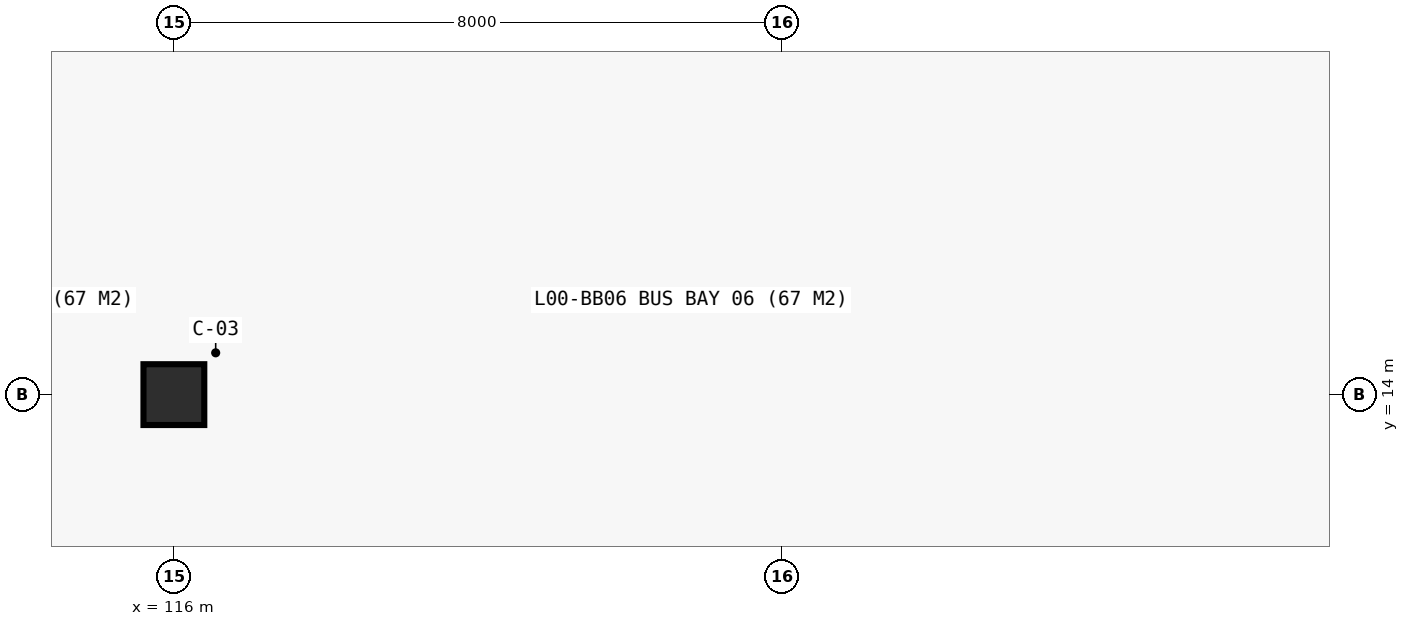
"""IFC4 building model, lengths in metres.
Left out: names, types, materials, properties, quantities, classifications, styles, units other than length and angle.
Written with IfcOpenShell. Run it as: python <this file> out.ifc"""

import sys

from ifc_helpers import new_model, si_unit, direction, frame, origin, origin_2d, place, context, subcontext, project, spatial, rectangle, extrude, element, save


model = new_model("IFC4")
c1 = context("Model", 3, precision=1e-05, world=origin(), true_north=direction((0.0, 1.0)))
c2 = subcontext(c1, "Body", "Model", "MODEL_VIEW")
j1 = project(units=[si_unit("LENGTHUNIT", "METRE"), si_unit("PLANEANGLEUNIT", "RADIAN")], contexts=[c1])
p1 = place(None, origin())
s1 = spatial("IfcSite", under=j1, at=p1, CompositionType="ELEMENT")
p2 = place(p1, origin())
s2 = spatial("IfcBuilding", under=s1, at=p2, CompositionType="ELEMENT")
p3 = place(p2, origin())
s3 = spatial("IfcBuildingStorey", under=s2, at=p3, CompositionType="ELEMENT", Elevation=0.0)
p4 = place(p3, frame((116.0, 14.0, 0.0), z_axis=(0.0, 0.0, 1.0), x_axis=(1.0, 0.0, 0.0)))
e1 = element("IfcColumn", 1, at=p4, inside=s3, PredefinedType="COLUMN", context=c2, shape_type="SweptSolid", body=[
    extrude(rectangle(XDim=0.8, YDim=0.8, at=origin_2d()), origin(), (0.0, 0.0, 1.0), 6.6),
])
save(model, sys.argv[1])
